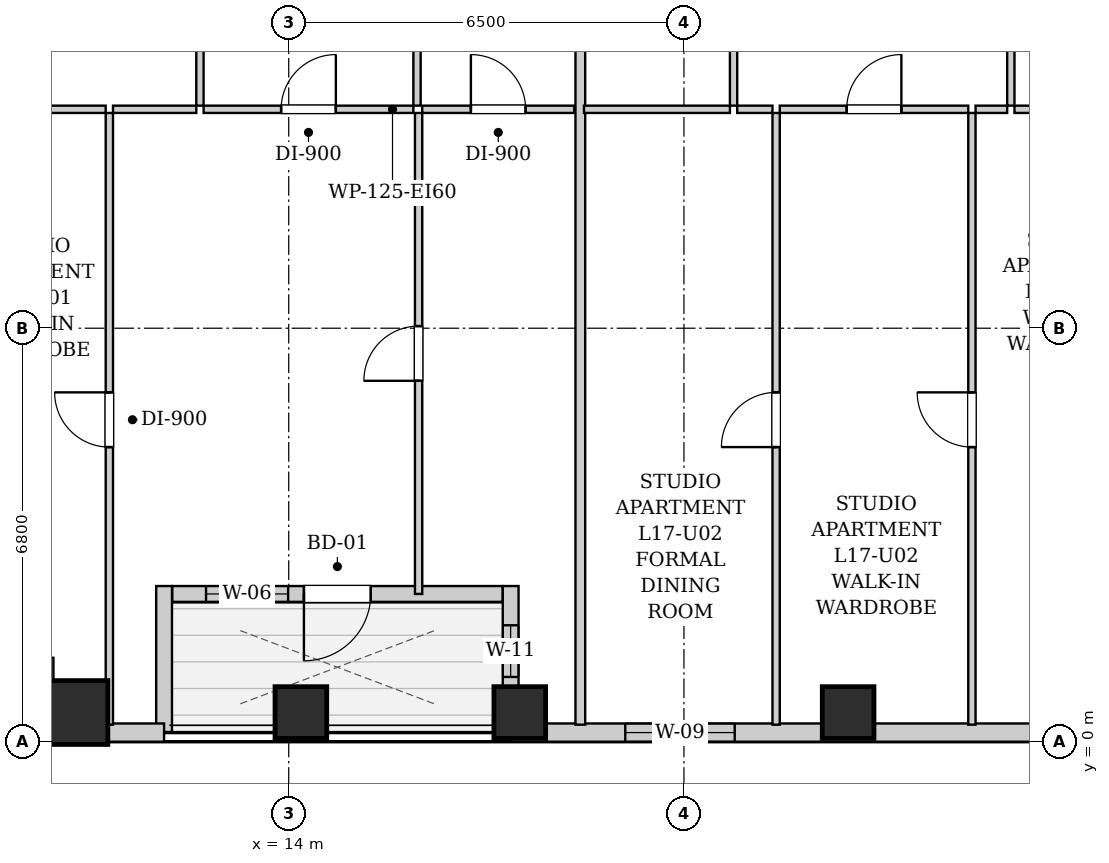
"""IFC4 building model, lengths in metres.
Left out: names, types, materials, properties, quantities, classifications, styles, units other than length and angle.
Written with IfcOpenShell. Run it as: python <this file> out.ifc"""

import sys

from ifc_helpers import new_model, si_unit, direction, frame, frame_2d, origin, origin_2d, place, context, subcontext, project, spatial, rectangle, extrude, element, fill, save


model = new_model("IFC4")
c1 = context("Model", 3, precision=1e-05, world=origin(), true_north=direction((0.0, 1.0)))
c2 = subcontext(c1, "Body", "Model", "MODEL_VIEW")
j1 = project(units=[si_unit("LENGTHUNIT", "METRE"), si_unit("PLANEANGLEUNIT", "RADIAN")], contexts=[c1])
p1 = place(None, origin())
s1 = spatial("IfcSite", under=j1, at=p1, CompositionType="ELEMENT")
p2 = place(p1, origin())
s2 = spatial("IfcBuilding", under=s1, at=p2, CompositionType="ELEMENT")
p3 = place(p2, frame((0.0, 0.0, 64.2)))
s3 = spatial("IfcBuildingStorey", under=s2, at=p3, CompositionType="ELEMENT", Elevation=64.2)
p4 = place(p3, frame((10.5, 0.48, 0.0), z_axis=(0.0, 0.0, 1.0), x_axis=(1.0, 0.0, 0.0)))
e1 = element("IfcColumn", 1, at=p4, inside=s3, PredefinedType="COLUMN", context=c2, shape_type="SweptSolid", body=[
    extrude(rectangle(XDim=1.05, YDim=1.05, at=origin_2d()), origin(), (0.0, 0.0, 1.0), 3.2),
])
for number, where, z_axis, x_axis in (
    (2, (14.2, 0.48, 0.0), (0.0, 0.0, 1.0), (1.0, 0.0, 0.0)),
    (3, (17.8, 0.48, 0.0), (0.0, 0.0, 1.0), (1.0, 0.0, 0.0)),
    (4, (23.2, 0.48, 0.0), (0.0, 0.0, 1.0), (1.0, 0.0, 0.0)),
):
    element("IfcColumn", number, at=place(p3, frame(where, z_axis=z_axis, x_axis=x_axis)), inside=s3, PredefinedType="COLUMN", context=c2, shape_type="SweptSolid", body=[
        extrude(rectangle(XDim=0.85, YDim=0.85, at=origin_2d()), origin(), (0.0, 0.0, 1.0), 3.2),
    ])
p5 = place(p3, frame((44.0, 0.15, 0.0), z_axis=(0.0, 0.0, 1.0), x_axis=(-1.0, 0.0, 0.0)))
e5 = element("IfcWall", 5, at=p5, inside=s3, PredefinedType="SOLIDWALL", context=c2, shape_type="SweptSolid", body=[
    extrude(rectangle(XDim=26.35, YDim=0.3, at=frame_2d((13.175, 0.0))), origin(), (0.0, 0.0, 1.0), 1.975),
])
p6 = place(p5, frame((22.665, 0.0, 0.55)))
e6 = element("IfcOpeningElement", 6, at=p6, cuts=e5, PredefinedType="OPENING", context=c2, shape_type="SweptSolid", body=[
    extrude(rectangle(XDim=1.8, YDim=1.2, at=frame_2d((0.9, 0.6))), frame((0.0, 0.16, 0.0), z_axis=(0.0, -1.0, 0.0), x_axis=(1.0, 0.0, 0.0)), (0.0, 0.0, 1.0), 0.32),
])
p7 = place(p5, frame((15.82, 0.0, 0.55)))
e7 = element("IfcOpeningElement", 7, at=p7, cuts=e5, PredefinedType="OPENING", context=c2, shape_type="SweptSolid", body=[
    extrude(rectangle(XDim=0.68, YDim=1.2, at=frame_2d((0.34, 0.6))), frame((0.0, 0.16, 0.0), z_axis=(0.0, -1.0, 0.0), x_axis=(1.0, 0.0, 0.0)), (0.0, 0.0, 1.0), 0.32),
])
p8 = place(p5, frame((13.027, 0.0, 0.55)))
e8 = element("IfcOpeningElement", 8, at=p8, cuts=e5, PredefinedType="OPENING", context=c2, shape_type="SweptSolid", body=[
    extrude(rectangle(XDim=1.8, YDim=1.2, at=frame_2d((0.9, 0.6))), frame((0.0, 0.16, 0.0), z_axis=(0.0, -1.0, 0.0), x_axis=(1.0, 0.0, 0.0)), (0.0, 0.0, 1.0), 0.32),
])
p9 = place(p5, frame((9.365, 0.0, 0.55)))
e9 = element("IfcOpeningElement", 9, at=p9, cuts=e5, PredefinedType="OPENING", context=c2, shape_type="SweptSolid", body=[
    extrude(rectangle(XDim=0.85, YDim=1.2, at=frame_2d((0.425, 0.6))), frame((0.0, 0.16, 0.0), z_axis=(0.0, -1.0, 0.0), x_axis=(1.0, 0.0, 0.0)), (0.0, 0.0, 1.0), 0.32),
])
p10 = place(p5, frame((6.553, 0.0, 0.55)))
e10 = element("IfcOpeningElement", 10, at=p10, cuts=e5, PredefinedType="OPENING", context=c2, shape_type="SweptSolid", body=[
    extrude(rectangle(XDim=1.8, YDim=1.2, at=frame_2d((0.9, 0.6))), frame((0.0, 0.16, 0.0), z_axis=(0.0, -1.0, 0.0), x_axis=(1.0, 0.0, 0.0)), (0.0, 0.0, 1.0), 0.32),
])
p11 = place(p5, frame((2.262, 0.0, 0.55)))
e11 = element("IfcOpeningElement", 11, at=p11, cuts=e5, PredefinedType="OPENING", context=c2, shape_type="SweptSolid", body=[
    extrude(rectangle(XDim=1.8, YDim=1.2, at=frame_2d((0.9, 0.6))), frame((0.0, 0.16, 0.0), z_axis=(0.0, -1.0, 0.0), x_axis=(1.0, 0.0, 0.0)), (0.0, 0.0, 1.0), 0.32),
])
p12 = place(p3, frame((17.65, 0.16, 0.0), z_axis=(0.0, 0.0, 1.0), x_axis=(0.0, 1.0, 0.0)))
e12 = element("IfcWall", 12, at=p12, inside=s3, PredefinedType="SOLIDWALL", context=c2, shape_type="SweptSolid", body=[
    extrude(rectangle(XDim=2.4, YDim=0.26, at=frame_2d((1.2, 0.0))), origin(), (0.0, 0.0, 1.0), 2.94),
])
p13 = place(p12, frame((0.905, 0.0, 0.55)))
e13 = element("IfcOpeningElement", 13, at=p13, cuts=e12, PredefinedType="OPENING", context=c2, shape_type="SweptSolid", body=[
    extrude(rectangle(XDim=0.85, YDim=1.2, at=frame_2d((0.425, 0.6))), frame((0.0, 0.14, 0.0), z_axis=(0.0, -1.0, 0.0), x_axis=(1.0, 0.0, 0.0)), (0.0, 0.0, 1.0), 0.28),
])
p14 = place(p3, frame((17.516, 2.43, 0.0), z_axis=(0.0, 0.0, 1.0), x_axis=(-1.0, 0.0, 0.0)))
e14 = element("IfcWall", 14, at=p14, inside=s3, PredefinedType="SOLIDWALL", context=c2, shape_type="SweptSolid", body=[
    extrude(rectangle(XDim=5.432, YDim=0.26, at=frame_2d((2.716, 0.0))), origin(), (0.0, 0.0, 1.0), 2.94),
])
p15 = place(p14, frame((2.166, 0.0, 0.0)))
e15 = element("IfcOpeningElement", 15, at=p15, cuts=e14, PredefinedType="OPENING", context=c2, shape_type="SweptSolid", body=[
    extrude(rectangle(XDim=1.1, YDim=2.0, at=frame_2d((0.55, 1.0))), frame((0.0, 0.14, 0.0), z_axis=(0.0, -1.0, 0.0), x_axis=(1.0, 0.0, 0.0)), (0.0, 0.0, 1.0), 0.28),
])
p16 = place(p14, frame((3.526, 0.0, 0.85)))
e16 = element("IfcOpeningElement", 16, at=p16, cuts=e14, PredefinedType="OPENING", context=c2, shape_type="SweptSolid", body=[
    extrude(rectangle(XDim=1.35, YDim=1.65, at=frame_2d((0.675, 0.825))), frame((0.0, 0.14, 0.0), z_axis=(0.0, -1.0, 0.0), x_axis=(1.0, 0.0, 0.0)), (0.0, 0.0, 1.0), 0.28),
])
p17 = place(p3, frame((11.95, 2.56, 0.0), z_axis=(0.0, 0.0, 1.0), x_axis=(0.0, -1.0, 0.0)))
e17 = element("IfcWall", 17, at=p17, inside=s3, PredefinedType="SOLIDWALL", context=c2, shape_type="SweptSolid", body=[
    extrude(rectangle(XDim=2.4, YDim=0.26, at=frame_2d((1.2, 0.0))), origin(), (0.0, 0.0, 1.0), 2.94),
])
p18 = place(p3, frame((11.95, 0.15, 0.0), z_axis=(0.0, 0.0, 1.0), x_axis=(-1.0, 0.0, 0.0)))
e18 = element("IfcWall", 18, at=p18, inside=s3, PredefinedType="SOLIDWALL", context=c2, shape_type="SweptSolid", body=[
    extrude(rectangle(XDim=1.95, YDim=0.3, at=frame_2d((0.975, 0.0))), origin(), (0.0, 0.0, 1.0), 1.975),
])
p19 = place(p3, frame((10.0, 0.302, 0.0), z_axis=(0.0, 0.0, 1.0), x_axis=(0.0, 1.0, 0.0)))
e19 = element("IfcWall", 19, at=p19, inside=s3, PredefinedType="SOLIDWALL", context=c2, shape_type="SweptSolid", body=[
    extrude(rectangle(XDim=1.078, YDim=0.26, at=frame_2d((0.539, 0.0))), origin(), (0.0, 0.0, 1.0), 2.94),
])
p20 = place(p3, frame((12.54, 10.46, 0.0), z_axis=(0.0, 0.0, 1.0), x_axis=(0.0, 1.0, 0.0)))
e20 = element("IfcWall", 20, at=p20, inside=s3, PredefinedType="PARTITIONING", context=c2, shape_type="SweptSolid", body=[
    extrude(rectangle(XDim=2.85, YDim=0.12, at=frame_2d((1.425, 0.0))), origin(), (0.0, 0.0, 1.0), 2.94),
])
p21 = place(p20, frame((0.995, 0.0, 0.0)))
e21 = element("IfcOpeningElement", 21, at=p21, cuts=e20, PredefinedType="OPENING", context=c2, shape_type="SweptSolid", body=[
    extrude(rectangle(XDim=0.86, YDim=2.05, at=frame_2d((0.43, 1.025))), frame((0.0, 0.07, 0.0), z_axis=(0.0, -1.0, 0.0), x_axis=(1.0, 0.0, 0.0)), (0.0, 0.0, 1.0), 0.14),
])
p22 = place(p3, frame((10.08, 10.4, 0.0), z_axis=(0.0, 0.0, 1.0), x_axis=(1.0, 0.0, 0.0)))
e22 = element("IfcWall", 22, at=p22, inside=s3, PredefinedType="PARTITIONING", context=c2, shape_type="SweptSolid", body=[
    extrude(rectangle(XDim=0.91, YDim=0.12, at=frame_2d((0.455, 0.0))), origin(), (0.0, 0.0, 1.0), 2.94),
])
p23 = place(p3, frame((11.11, 10.4, 0.0), z_axis=(0.0, 0.0, 1.0), x_axis=(1.0, 0.0, 0.0)))
e23 = element("IfcWall", 23, at=p23, inside=s3, PredefinedType="PARTITIONING", context=c2, shape_type="SweptSolid", body=[
    extrude(rectangle(XDim=1.37, YDim=0.12, at=frame_2d((0.685, 0.0))), origin(), (0.0, 0.0, 1.0), 2.94),
])
p24 = place(p3, frame((16.11, 10.46, 0.0), z_axis=(0.0, 0.0, 1.0), x_axis=(0.0, 1.0, 0.0)))
e24 = element("IfcWall", 24, at=p24, inside=s3, PredefinedType="PARTITIONING", context=c2, shape_type="SweptSolid", body=[
    extrude(rectangle(XDim=2.85, YDim=0.12, at=frame_2d((1.425, 0.0))), origin(), (0.0, 0.0, 1.0), 2.94),
])
p25 = place(p24, frame((0.975, 0.0, 0.0)))
e25 = element("IfcOpeningElement", 25, at=p25, cuts=e24, PredefinedType="OPENING", context=c2, shape_type="SweptSolid", body=[
    extrude(rectangle(XDim=0.9, YDim=2.05, at=frame_2d((0.45, 1.025))), frame((0.0, 0.07, 0.0), z_axis=(0.0, -1.0, 0.0), x_axis=(1.0, 0.0, 0.0)), (0.0, 0.0, 1.0), 0.14),
])
p26 = place(p3, frame((12.6, 10.4, 0.0), z_axis=(0.0, 0.0, 1.0), x_axis=(1.0, 0.0, 0.0)))
e26 = element("IfcWall", 26, at=p26, inside=s3, PredefinedType="PARTITIONING", context=c2, shape_type="SweptSolid", body=[
    extrude(rectangle(XDim=3.45, YDim=0.12, at=frame_2d((1.725, 0.0))), origin(), (0.0, 0.0, 1.0), 2.94),
])
p27 = place(p26, frame((1.275, 0.0, 0.0)))
e27 = element("IfcOpeningElement", 27, at=p27, cuts=e26, PredefinedType="OPENING", context=c2, shape_type="SweptSolid", body=[
    extrude(rectangle(XDim=0.9, YDim=2.05, at=frame_2d((0.45, 1.025))), frame((0.0, 0.07, 0.0), z_axis=(0.0, -1.0, 0.0), x_axis=(1.0, 0.0, 0.0)), (0.0, 0.0, 1.0), 0.14),
])
p28 = place(p3, frame((16.196, 10.4, 0.0), z_axis=(0.0, 0.0, 1.0), x_axis=(1.0, 0.0, 0.0)))
e28 = element("IfcWall", 28, at=p28, inside=s3, PredefinedType="PARTITIONING", context=c2, shape_type="SweptSolid", body=[
    extrude(rectangle(XDim=2.5, YDim=0.12, at=frame_2d((1.25, 0.0))), origin(), (0.0, 0.0, 1.0), 2.94),
])
p29 = place(p28, frame((0.8, 0.0, 0.0)))
e29 = element("IfcOpeningElement", 29, at=p29, cuts=e28, PredefinedType="OPENING", context=c2, shape_type="SweptSolid", body=[
    extrude(rectangle(XDim=0.9, YDim=2.05, at=frame_2d((0.45, 1.025))), frame((0.0, 0.07, 0.0), z_axis=(0.0, -1.0, 0.0), x_axis=(1.0, 0.0, 0.0)), (0.0, 0.0, 1.0), 0.14),
])
p30 = place(p3, frame((11.05, 0.28, 0.0), z_axis=(0.0, 0.0, 1.0), x_axis=(0.0, 1.0, 0.0)))
e30 = element("IfcWall", 30, at=p30, inside=s3, PredefinedType="PARTITIONING", context=c2, shape_type="SweptSolid", body=[
    extrude(rectangle(XDim=10.06, YDim=0.12, at=frame_2d((5.03, 0.0))), origin(), (0.0, 0.0, 1.0), 2.94),
])
p31 = place(p30, frame((4.565, 0.0, 0.0)))
e31 = element("IfcOpeningElement", 31, at=p31, cuts=e30, PredefinedType="OPENING", context=c2, shape_type="SweptSolid", body=[
    extrude(rectangle(XDim=0.9, YDim=2.05, at=frame_2d((0.45, 1.025))), frame((0.0, 0.07, 0.0), z_axis=(0.0, -1.0, 0.0), x_axis=(1.0, 0.0, 0.0)), (0.0, 0.0, 1.0), 0.14),
])
p32 = place(p3, frame((16.136, 2.43, 0.0), z_axis=(0.0, 0.0, 1.0), x_axis=(0.0, 1.0, 0.0)))
e32 = element("IfcWall", 32, at=p32, inside=s3, PredefinedType="PARTITIONING", context=c2, shape_type="SweptSolid", body=[
    extrude(rectangle(XDim=7.91, YDim=0.12, at=frame_2d((3.955, 0.0))), origin(), (0.0, 0.0, 1.0), 2.94),
])
p33 = place(p32, frame((3.505, 0.0, 0.0)))
e33 = element("IfcOpeningElement", 33, at=p33, cuts=e32, PredefinedType="OPENING", context=c2, shape_type="SweptSolid", body=[
    extrude(rectangle(XDim=0.9, YDim=2.05, at=frame_2d((0.45, 1.025))), frame((0.0, 0.07, 0.0), z_axis=(0.0, -1.0, 0.0), x_axis=(1.0, 0.0, 0.0)), (0.0, 0.0, 1.0), 0.14),
])
p34 = place(p3, frame((18.796, 0.28, 0.0), z_axis=(0.0, 0.0, 1.0), x_axis=(0.0, 1.0, 0.0)))
e34 = element("IfcWall", 34, at=p34, inside=s3, PredefinedType="PARTITIONING", context=c2, shape_type="SweptSolid", body=[
    extrude(rectangle(XDim=13.03, YDim=0.16, at=frame_2d((6.515, 0.0))), origin(), (0.0, 0.0, 1.0), 2.94),
])
p35 = place(p3, frame((21.316, 10.46, 0.0), z_axis=(0.0, 0.0, 1.0), x_axis=(0.0, 1.0, 0.0)))
e35 = element("IfcWall", 35, at=p35, inside=s3, PredefinedType="PARTITIONING", context=c2, shape_type="SweptSolid", body=[
    extrude(rectangle(XDim=2.85, YDim=0.12, at=frame_2d((1.425, 0.0))), origin(), (0.0, 0.0, 1.0), 2.94),
])
p36 = place(p35, frame((0.995, 0.0, 0.0)))
e36 = element("IfcOpeningElement", 36, at=p36, cuts=e35, PredefinedType="OPENING", context=c2, shape_type="SweptSolid", body=[
    extrude(rectangle(XDim=0.86, YDim=2.05, at=frame_2d((0.43, 1.025))), frame((0.0, 0.07, 0.0), z_axis=(0.0, -1.0, 0.0), x_axis=(1.0, 0.0, 0.0)), (0.0, 0.0, 1.0), 0.14),
])
p37 = place(p3, frame((18.856, 10.4, 0.0), z_axis=(0.0, 0.0, 1.0), x_axis=(1.0, 0.0, 0.0)))
e37 = element("IfcWall", 37, at=p37, inside=s3, PredefinedType="PARTITIONING", context=c2, shape_type="SweptSolid", body=[
    extrude(rectangle(XDim=2.4, YDim=0.12, at=frame_2d((1.2, 0.0))), origin(), (0.0, 0.0, 1.0), 2.94),
])
p38 = place(p3, frame((25.876, 10.46, 0.0), z_axis=(0.0, 0.0, 1.0), x_axis=(0.0, 1.0, 0.0)))
e38 = element("IfcWall", 38, at=p38, inside=s3, PredefinedType="PARTITIONING", context=c2, shape_type="SweptSolid", body=[
    extrude(rectangle(XDim=2.85, YDim=0.12, at=frame_2d((1.425, 0.0))), origin(), (0.0, 0.0, 1.0), 2.94),
])
p39 = place(p38, frame((0.975, 0.0, 0.0)))
e39 = element("IfcOpeningElement", 39, at=p39, cuts=e38, PredefinedType="OPENING", context=c2, shape_type="SweptSolid", body=[
    extrude(rectangle(XDim=0.9, YDim=2.05, at=frame_2d((0.45, 1.025))), frame((0.0, 0.07, 0.0), z_axis=(0.0, -1.0, 0.0), x_axis=(1.0, 0.0, 0.0)), (0.0, 0.0, 1.0), 0.14),
])
p40 = place(p3, frame((21.376, 10.4, 0.0), z_axis=(0.0, 0.0, 1.0), x_axis=(1.0, 0.0, 0.0)))
e40 = element("IfcWall", 40, at=p40, inside=s3, PredefinedType="PARTITIONING", context=c2, shape_type="SweptSolid", body=[
    extrude(rectangle(XDim=0.58, YDim=0.12, at=frame_2d((0.29, 0.0))), origin(), (0.0, 0.0, 1.0), 2.94),
])
p41 = place(p3, frame((22.076, 10.4, 0.0), z_axis=(0.0, 0.0, 1.0), x_axis=(1.0, 0.0, 0.0)))
e41 = element("IfcWall", 41, at=p41, inside=s3, PredefinedType="PARTITIONING", context=c2, shape_type="SweptSolid", body=[
    extrude(rectangle(XDim=3.1, YDim=0.12, at=frame_2d((1.55, 0.0))), origin(), (0.0, 0.0, 1.0), 2.94),
])
p42 = place(p41, frame((1.1, 0.0, 0.0)))
e42 = element("IfcOpeningElement", 42, at=p42, cuts=e41, PredefinedType="OPENING", context=c2, shape_type="SweptSolid", body=[
    extrude(rectangle(XDim=0.9, YDim=2.05, at=frame_2d((0.45, 1.025))), frame((0.0, 0.07, 0.0), z_axis=(0.0, -1.0, 0.0), x_axis=(1.0, 0.0, 0.0)), (0.0, 0.0, 1.0), 0.14),
])
p43 = place(p3, frame((25.296, 10.4, 0.0), z_axis=(0.0, 0.0, 1.0), x_axis=(1.0, 0.0, 0.0)))
e43 = element("IfcWall", 43, at=p43, inside=s3, PredefinedType="PARTITIONING", context=c2, shape_type="SweptSolid", body=[
    extrude(rectangle(XDim=0.52, YDim=0.12, at=frame_2d((0.26, 0.0))), origin(), (0.0, 0.0, 1.0), 2.94),
])
p44 = place(p3, frame((25.936, 10.4, 0.0), z_axis=(0.0, 0.0, 1.0), x_axis=(1.0, 0.0, 0.0)))
e44 = element("IfcWall", 44, at=p44, inside=s3, PredefinedType="PARTITIONING", context=c2, shape_type="SweptSolid", body=[
    extrude(rectangle(XDim=2.46, YDim=0.12, at=frame_2d((1.23, 0.0))), origin(), (0.0, 0.0, 1.0), 2.94),
])
p45 = place(p44, frame((0.78, 0.0, 0.0)))
e45 = element("IfcOpeningElement", 45, at=p45, cuts=e44, PredefinedType="OPENING", context=c2, shape_type="SweptSolid", body=[
    extrude(rectangle(XDim=0.9, YDim=2.05, at=frame_2d((0.45, 1.025))), frame((0.0, 0.07, 0.0), z_axis=(0.0, -1.0, 0.0), x_axis=(1.0, 0.0, 0.0)), (0.0, 0.0, 1.0), 0.14),
])
p46 = place(p3, frame((22.016, 0.28, 0.0), z_axis=(0.0, 0.0, 1.0), x_axis=(0.0, 1.0, 0.0)))
e46 = element("IfcWall", 46, at=p46, inside=s3, PredefinedType="PARTITIONING", context=c2, shape_type="SweptSolid", body=[
    extrude(rectangle(XDim=10.06, YDim=0.12, at=frame_2d((5.03, 0.0))), origin(), (0.0, 0.0, 1.0), 2.94),
])
p47 = place(p46, frame((4.565, 0.0, 0.0)))
e47 = element("IfcOpeningElement", 47, at=p47, cuts=e46, PredefinedType="OPENING", context=c2, shape_type="SweptSolid", body=[
    extrude(rectangle(XDim=0.9, YDim=2.05, at=frame_2d((0.45, 1.025))), frame((0.0, 0.07, 0.0), z_axis=(0.0, -1.0, 0.0), x_axis=(1.0, 0.0, 0.0)), (0.0, 0.0, 1.0), 0.14),
])
p48 = place(p3, frame((25.236, 0.28, 0.0), z_axis=(0.0, 0.0, 1.0), x_axis=(0.0, 1.0, 0.0)))
e48 = element("IfcWall", 48, at=p48, inside=s3, PredefinedType="PARTITIONING", context=c2, shape_type="SweptSolid", body=[
    extrude(rectangle(XDim=10.06, YDim=0.12, at=frame_2d((5.03, 0.0))), origin(), (0.0, 0.0, 1.0), 2.94),
])
p49 = place(p48, frame((4.565, 0.0, 0.0)))
e49 = element("IfcOpeningElement", 49, at=p49, cuts=e48, PredefinedType="OPENING", context=c2, shape_type="SweptSolid", body=[
    extrude(rectangle(XDim=0.9, YDim=2.05, at=frame_2d((0.45, 1.025))), frame((0.0, 0.07, 0.0), z_axis=(0.0, -1.0, 0.0), x_axis=(1.0, 0.0, 0.0)), (0.0, 0.0, 1.0), 0.14),
])
p50 = place(p27, origin())
e50 = element("IfcDoor", 50, at=p50, inside=s3, OperationType="SINGLE_SWING_RIGHT", PredefinedType="DOOR", context=c2, shape_type="SweptSolid", body=[
    extrude(rectangle(XDim=0.9, YDim=2.05, at=frame_2d((0.45, 1.025))), frame((0.0, 0.025, 0.0), z_axis=(0.0, -1.0, 0.0), x_axis=(1.0, 0.0, 0.0)), (0.0, 0.0, 1.0), 0.05),
])
fill(e27, e50)
p51 = place(p29, origin())
e51 = element("IfcDoor", 51, at=p51, inside=s3, OperationType="SINGLE_SWING_LEFT", PredefinedType="DOOR", context=c2, shape_type="SweptSolid", body=[
    extrude(rectangle(XDim=0.9, YDim=2.05, at=frame_2d((0.45, 1.025))), frame((0.0, 0.025, 0.0), z_axis=(0.0, -1.0, 0.0), x_axis=(1.0, 0.0, 0.0)), (0.0, 0.0, 1.0), 0.05),
])
fill(e29, e51)
p52 = place(p31, origin())
e52 = element("IfcDoor", 52, at=p52, inside=s3, OperationType="SINGLE_SWING_RIGHT", PredefinedType="DOOR", context=c2, shape_type="SweptSolid", body=[
    extrude(rectangle(XDim=0.9, YDim=2.05, at=frame_2d((0.45, 1.025))), frame((0.0, 0.025, 0.0), z_axis=(0.0, -1.0, 0.0), x_axis=(1.0, 0.0, 0.0)), (0.0, 0.0, 1.0), 0.05),
])
fill(e31, e52)
p53 = place(p33, origin())
e53 = element("IfcDoor", 53, at=p53, inside=s3, OperationType="SINGLE_SWING_LEFT", PredefinedType="DOOR", context=c2, shape_type="SweptSolid", body=[
    extrude(rectangle(XDim=0.9, YDim=2.05, at=frame_2d((0.45, 1.025))), frame((0.0, 0.025, 0.0), z_axis=(0.0, -1.0, 0.0), x_axis=(1.0, 0.0, 0.0)), (0.0, 0.0, 1.0), 0.05),
])
fill(e33, e53)
p54 = place(p42, origin())
e54 = element("IfcDoor", 54, at=p54, inside=s3, OperationType="SINGLE_SWING_RIGHT", PredefinedType="DOOR", context=c2, shape_type="SweptSolid", body=[
    extrude(rectangle(XDim=0.9, YDim=2.05, at=frame_2d((0.45, 1.025))), frame((0.0, 0.025, 0.0), z_axis=(0.0, -1.0, 0.0), x_axis=(1.0, 0.0, 0.0)), (0.0, 0.0, 1.0), 0.05),
])
fill(e42, e54)
p55 = place(p47, origin())
e55 = element("IfcDoor", 55, at=p55, inside=s3, OperationType="SINGLE_SWING_LEFT", PredefinedType="DOOR", context=c2, shape_type="SweptSolid", body=[
    extrude(rectangle(XDim=0.9, YDim=2.05, at=frame_2d((0.45, 1.025))), frame((0.0, 0.025, 0.0), z_axis=(0.0, -1.0, 0.0), x_axis=(1.0, 0.0, 0.0)), (0.0, 0.0, 1.0), 0.05),
])
fill(e47, e55)
p56 = place(p49, origin())
e56 = element("IfcDoor", 56, at=p56, inside=s3, OperationType="SINGLE_SWING_RIGHT", PredefinedType="DOOR", context=c2, shape_type="SweptSolid", body=[
    extrude(rectangle(XDim=0.9, YDim=2.05, at=frame_2d((0.45, 1.025))), frame((0.0, 0.025, 0.0), z_axis=(0.0, -1.0, 0.0), x_axis=(1.0, 0.0, 0.0)), (0.0, 0.0, 1.0), 0.05),
])
fill(e49, e56)
p57 = place(p15, origin())
e57 = element("IfcDoor", 57, at=p57, inside=s3, OperationType="SINGLE_SWING_RIGHT", PredefinedType="DOOR", context=c2, shape_type="SweptSolid", body=[
    extrude(rectangle(XDim=1.1, YDim=2.0, at=frame_2d((0.55, 1.0))), frame((0.0, 0.025, 0.0), z_axis=(0.0, -1.0, 0.0), x_axis=(1.0, 0.0, 0.0)), (0.0, 0.0, 1.0), 0.05),
])
fill(e15, e57)
p58 = place(p16, origin())
e58 = element("IfcWindow", 58, at=p58, inside=s3, PartitioningType="SINGLE_PANEL", PredefinedType="WINDOW", context=c2, shape_type="SweptSolid", body=[
    extrude(rectangle(XDim=1.35, YDim=1.65, at=frame_2d((0.675, 0.825))), frame((0.0, 0.03, 0.0), z_axis=(0.0, -1.0, 0.0), x_axis=(1.0, 0.0, 0.0)), (0.0, 0.0, 1.0), 0.06),
])
fill(e16, e58)
p59 = place(p13, origin())
e59 = element("IfcWindow", 59, at=p59, inside=s3, PartitioningType="SINGLE_PANEL", PredefinedType="WINDOW", context=c2, shape_type="SweptSolid", body=[
    extrude(rectangle(XDim=0.85, YDim=1.2, at=frame_2d((0.425, 0.6))), frame((0.0, 0.03, 0.0), z_axis=(0.0, -1.0, 0.0), x_axis=(1.0, 0.0, 0.0)), (0.0, 0.0, 1.0), 0.06),
])
fill(e13, e59)
p60 = place(p6, origin())
e60 = element("IfcWindow", 60, at=p60, inside=s3, PartitioningType="DOUBLE_PANEL_VERTICAL", PredefinedType="WINDOW", context=c2, shape_type="SweptSolid", body=[
    extrude(rectangle(XDim=1.8, YDim=1.2, at=frame_2d((0.9, 0.6))), frame((0.0, 0.03, 0.0), z_axis=(0.0, -1.0, 0.0), x_axis=(1.0, 0.0, 0.0)), (0.0, 0.0, 1.0), 0.06),
])
fill(e6, e60)
save(model, sys.argv[1])
